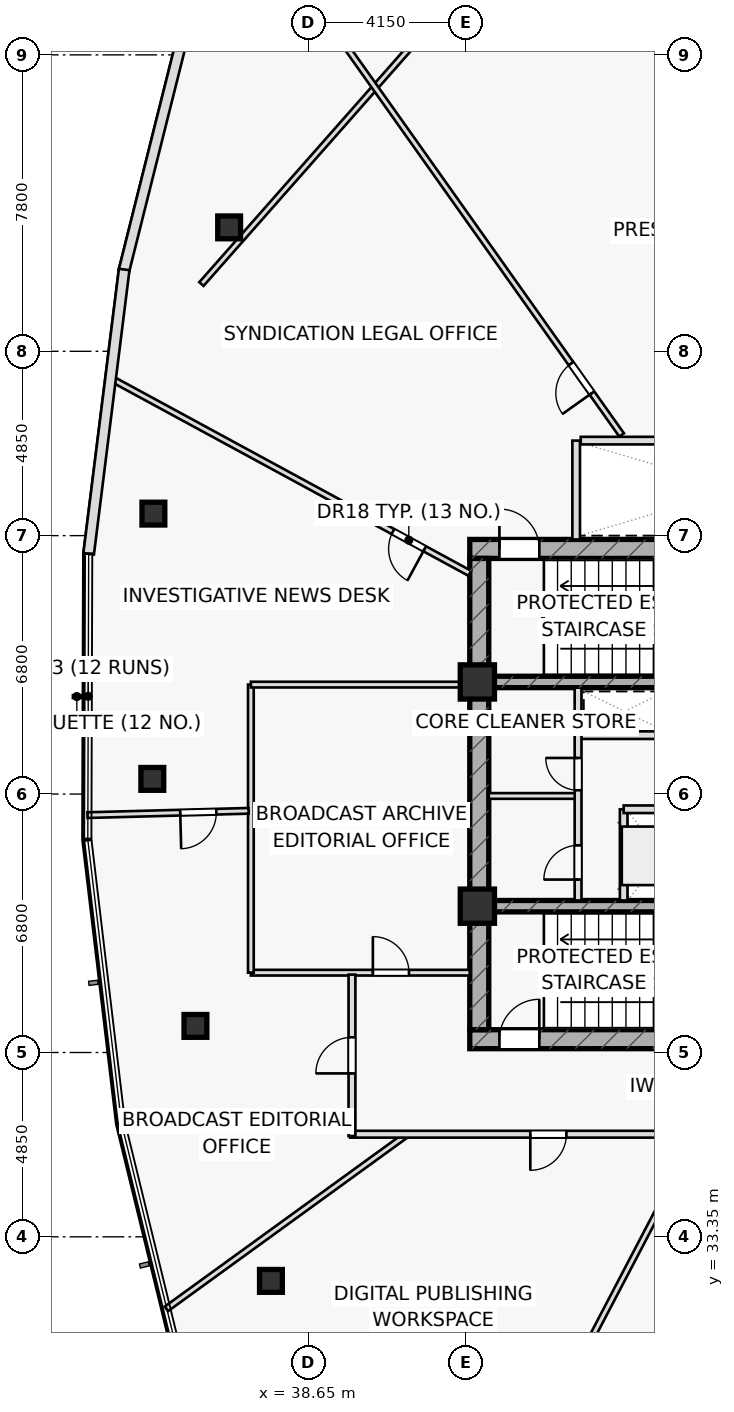
"""IFC4 building model, lengths in metres.
Left out: names, types, materials, properties, quantities, classifications, styles, units other than length and angle.
Written with IfcOpenShell. Run it as: python <this file> out.ifc"""

import sys

from ifc_helpers import new_model, si_unit, direction, frame, frame_2d, origin, origin_2d, place, context, subcontext, project, spatial, rectangle, hollow_rectangle, extrude, element, fill, save


model = new_model("IFC4")
c1 = context("Model", 3, precision=1e-05, world=origin(), true_north=direction((0.0, 1.0)))
c2 = subcontext(c1, "Body", "Model", "MODEL_VIEW")
j1 = project(units=[si_unit("LENGTHUNIT", "METRE"), si_unit("PLANEANGLEUNIT", "RADIAN")], contexts=[c1])
p1 = place(None, origin())
s1 = spatial("IfcSite", under=j1, at=p1, CompositionType="ELEMENT")
p2 = place(p1, origin())
s2 = spatial("IfcBuilding", under=s1, at=p2, CompositionType="ELEMENT")
p3 = place(p2, frame((0.0, 0.0, 173.35)))
s3 = spatial("IfcBuildingStorey", under=s2, at=p3, CompositionType="ELEMENT", Elevation=173.35)
p4 = place(p3, frame((42.9, 51.45, 0.0), z_axis=(0.0, 0.0, 1.0), x_axis=(1.0, 0.0, 0.0)))
e1 = element("IfcWall", 1, at=p4, inside=s3, PredefinedType="SHEAR", context=c2, shape_type="SweptSolid", body=[
    extrude(rectangle(XDim=14.2, YDim=0.5, at=frame_2d((7.1, 0.0))), origin(), (0.0, 0.0, 1.0), 3.55),
])
p5 = place(p4, frame((0.78, 0.0, 0.0)))
e2 = element("IfcOpeningElement", 2, at=p5, cuts=e1, PredefinedType="OPENING", context=c2, shape_type="SweptSolid", body=[
    extrude(rectangle(XDim=1.05, YDim=2.2, at=frame_2d((0.525, 1.1))), frame((0.0, 0.26, 0.0), z_axis=(0.0, -1.0, 0.0), x_axis=(1.0, 0.0, 0.0)), (0.0, 0.0, 1.0), 0.52),
])
p6 = place(p3, frame((42.9, 38.55, 0.0), z_axis=(0.0, 0.0, 1.0), x_axis=(1.0, 0.0, 0.0)))
e3 = element("IfcWall", 3, at=p6, inside=s3, PredefinedType="SHEAR", context=c2, shape_type="SweptSolid", body=[
    extrude(rectangle(XDim=14.2, YDim=0.5, at=frame_2d((7.1, 0.0))), origin(), (0.0, 0.0, 1.0), 3.55),
])
p7 = place(p6, frame((0.78, 0.0, 0.0)))
e4 = element("IfcOpeningElement", 4, at=p7, cuts=e3, PredefinedType="OPENING", context=c2, shape_type="SweptSolid", body=[
    extrude(rectangle(XDim=1.05, YDim=2.2, at=frame_2d((0.525, 1.1))), frame((0.0, 0.26, 0.0), z_axis=(0.0, -1.0, 0.0), x_axis=(1.0, 0.0, 0.0)), (0.0, 0.0, 1.0), 0.52),
])
p8 = place(p3, frame((43.15, 38.8, 0.0), z_axis=(0.0, 0.0, 1.0), x_axis=(0.0, 1.0, 0.0)))
e5 = element("IfcWall", 5, at=p8, inside=s3, PredefinedType="SHEAR", context=c2, shape_type="SweptSolid", body=[
    extrude(rectangle(XDim=12.4, YDim=0.5, at=frame_2d((6.2, 0.0))), origin(), (0.0, 0.0, 1.0), 3.55),
])
p9 = place(p3, frame((43.4, 47.95, 0.0), z_axis=(0.0, 0.0, 1.0), x_axis=(1.0, 0.0, 0.0)))
e6 = element("IfcWall", 6, at=p9, inside=s3, PredefinedType="SHEAR", context=c2, shape_type="SweptSolid", body=[
    extrude(rectangle(XDim=13.2, YDim=0.3, at=frame_2d((6.6, 0.0))), origin(), (0.0, 0.0, 1.0), 3.55),
])
p10 = place(p9, frame((8.345, 0.0, 0.0)))
e7 = element("IfcOpeningElement", 7, at=p10, cuts=e6, PredefinedType="OPENING", context=c2, shape_type="SweptSolid", body=[
    extrude(rectangle(XDim=1.15, YDim=2.2, at=frame_2d((0.575, 1.1))), frame((0.0, 0.16, 0.0), z_axis=(0.0, -1.0, 0.0), x_axis=(1.0, 0.0, 0.0)), (0.0, 0.0, 1.0), 0.32),
])
p11 = place(p9, frame((10.065, 0.0, 0.0)))
e8 = element("IfcOpeningElement", 8, at=p11, cuts=e6, PredefinedType="OPENING", context=c2, shape_type="SweptSolid", body=[
    extrude(rectangle(XDim=1.15, YDim=2.2, at=frame_2d((0.575, 1.1))), frame((0.0, 0.16, 0.0), z_axis=(0.0, -1.0, 0.0), x_axis=(1.0, 0.0, 0.0)), (0.0, 0.0, 1.0), 0.32),
])
p12 = place(p9, frame((11.645, 0.0, 0.0)))
e9 = element("IfcOpeningElement", 9, at=p12, cuts=e6, PredefinedType="OPENING", context=c2, shape_type="SweptSolid", body=[
    extrude(rectangle(XDim=1.15, YDim=2.2, at=frame_2d((0.575, 1.1))), frame((0.0, 0.16, 0.0), z_axis=(0.0, -1.0, 0.0), x_axis=(1.0, 0.0, 0.0)), (0.0, 0.0, 1.0), 0.32),
])
p13 = place(p3, frame((43.4, 42.05, 0.0), z_axis=(0.0, 0.0, 1.0), x_axis=(1.0, 0.0, 0.0)))
e10 = element("IfcWall", 10, at=p13, inside=s3, PredefinedType="SHEAR", context=c2, shape_type="SweptSolid", body=[
    extrude(rectangle(XDim=13.2, YDim=0.3, at=frame_2d((6.6, 0.0))), origin(), (0.0, 0.0, 1.0), 3.55),
])
p14 = place(p13, frame((8.37, 0.0, 0.0)))
e11 = element("IfcOpeningElement", 11, at=p14, cuts=e10, PredefinedType="OPENING", context=c2, shape_type="SweptSolid", body=[
    extrude(rectangle(XDim=1.1, YDim=2.15, at=frame_2d((0.55, 1.075))), frame((0.0, 0.16, 0.0), z_axis=(0.0, -1.0, 0.0), x_axis=(1.0, 0.0, 0.0)), (0.0, 0.0, 1.0), 0.32),
])
p15 = place(p13, frame((10.09, 0.0, 0.0)))
e12 = element("IfcOpeningElement", 12, at=p15, cuts=e10, PredefinedType="OPENING", context=c2, shape_type="SweptSolid", body=[
    extrude(rectangle(XDim=1.1, YDim=2.15, at=frame_2d((0.55, 1.075))), frame((0.0, 0.16, 0.0), z_axis=(0.0, -1.0, 0.0), x_axis=(1.0, 0.0, 0.0)), (0.0, 0.0, 1.0), 0.32),
])
p16 = place(p13, frame((11.83, 0.0, 0.0)))
e13 = element("IfcOpeningElement", 13, at=p16, cuts=e10, PredefinedType="OPENING", context=c2, shape_type="SweptSolid", body=[
    extrude(rectangle(XDim=1.1, YDim=2.15, at=frame_2d((0.55, 1.075))), frame((0.0, 0.16, 0.0), z_axis=(0.0, -1.0, 0.0), x_axis=(1.0, 0.0, 0.0)), (0.0, 0.0, 1.0), 0.32),
])
for number, where, z_axis, x_axis in (
    (14, (43.1, 47.95, 0.0), (0.0, 0.0, 1.0), (1.0, 0.0, 0.0)),
    (15, (43.1, 42.05, 0.0), (0.0, 0.0, 1.0), (1.0, 0.0, 0.0)),
):
    element("IfcColumn", number, at=place(p3, frame(where, z_axis=z_axis, x_axis=x_axis)), inside=s3, PredefinedType="COLUMN", context=c2, shape_type="SweptSolid", body=[
        extrude(rectangle(XDim=0.9, YDim=0.9, at=origin_2d()), origin(), (0.0, 0.0, 1.0), 3.55),
    ])
for number, where, z_axis, x_axis in (
    (16, (36.568, 59.911, 0.0), (0.0, 0.0, 1.0), (1.0, 0.0, 0.0)),
    (17, (34.575, 52.379, 0.0), (0.0, 0.0, 1.0), (1.0, 0.0, 0.0)),
    (18, (34.546, 45.399, 0.0), (0.0, 0.0, 1.0), (1.0, 0.0, 0.0)),
    (19, (35.681, 38.9, 0.0), (0.0, 0.0, 1.0), (1.0, 0.0, 0.0)),
    (20, (37.668, 32.19, 0.0), (0.0, 0.0, 1.0), (1.0, 0.0, 0.0)),
):
    element("IfcColumn", number, at=place(p3, frame(where, z_axis=z_axis, x_axis=x_axis)), inside=s3, PredefinedType="COLUMN", context=c2, shape_type="SweptSolid", body=[
        extrude(hollow_rectangle(XDim=0.6, YDim=0.6, WallThickness=0.036, at=origin_2d()), origin(), (0.0, 0.0, 1.0), 3.55),
    ])
p17 = place(p3, frame((45.7, 51.7, 0.0), z_axis=(0.0, 0.0, 1.0), x_axis=(0.0, 1.0, 0.0)))
e21 = element("IfcWall", 21, at=p17, inside=s3, PredefinedType="PARTITIONING", context=c2, shape_type="SweptSolid", body=[
    extrude(rectangle(XDim=2.6, YDim=0.2, at=frame_2d((1.3, 0.0))), origin(), (0.0, 0.0, 1.0), 3.55),
])
p18 = place(p3, frame((45.75, 46.55, 0.0), z_axis=(0.0, 0.0, 1.0), x_axis=(1.0, 0.0, 0.0)))
e22 = element("IfcWall", 22, at=p18, inside=s3, PredefinedType="PARTITIONING", context=c2, shape_type="SweptSolid", body=[
    extrude(rectangle(XDim=2.4, YDim=0.2, at=frame_2d((1.2, 0.0))), origin(), (0.0, 0.0, 1.0), 3.55),
])
p19 = place(p3, frame((46.95, 42.2, 0.0), z_axis=(0.0, 0.0, 1.0), x_axis=(0.0, 1.0, 0.0)))
e23 = element("IfcWall", 23, at=p19, inside=s3, PredefinedType="PARTITIONING", context=c2, shape_type="SweptSolid", body=[
    extrude(rectangle(XDim=2.4, YDim=0.2, at=frame_2d((1.2, 0.0))), origin(), (0.0, 0.0, 1.0), 3.55),
])
p20 = place(p3, frame((46.95, 44.6, 0.0), z_axis=(0.0, 0.0, 1.0), x_axis=(1.0, 0.0, 0.0)))
e24 = element("IfcWall", 24, at=p20, inside=s3, PredefinedType="PARTITIONING", context=c2, shape_type="SweptSolid", body=[
    extrude(rectangle(XDim=2.05, YDim=0.2, at=frame_2d((1.025, 0.0))), origin(), (0.0, 0.0, 1.0), 3.55),
])
p21 = place(p3, frame((43.4, 44.95, 0.0), z_axis=(0.0, 0.0, 1.0), x_axis=(1.0, 0.0, 0.0)))
e25 = element("IfcWall", 25, at=p21, inside=s3, PredefinedType="PARTITIONING", context=c2, shape_type="SweptSolid", body=[
    extrude(rectangle(XDim=2.35, YDim=0.15, at=frame_2d((1.175, 0.0))), origin(), (0.0, 0.0, 1.0), 3.55),
])
p22 = place(p3, frame((45.75, 42.2, 0.0), z_axis=(0.0, 0.0, 1.0), x_axis=(0.0, 1.0, 0.0)))
e26 = element("IfcWall", 26, at=p22, inside=s3, PredefinedType="PARTITIONING", context=c2, shape_type="SweptSolid", body=[
    extrude(rectangle(XDim=5.6, YDim=0.18, at=frame_2d((2.8, 0.0))), origin(), (0.0, 0.0, 1.0), 3.55),
])
p23 = place(p22, frame((0.55, 0.0, 0.0)))
e27 = element("IfcOpeningElement", 27, at=p23, cuts=e26, PredefinedType="OPENING", context=c2, shape_type="SweptSolid", body=[
    extrude(rectangle(XDim=0.9, YDim=2.05, at=frame_2d((0.45, 1.025))), frame((0.0, 0.1, 0.0), z_axis=(0.0, -1.0, 0.0), x_axis=(1.0, 0.0, 0.0)), (0.0, 0.0, 1.0), 0.2),
])
p24 = place(p22, frame((2.9, 0.0, 0.0)))
e28 = element("IfcOpeningElement", 28, at=p24, cuts=e26, PredefinedType="OPENING", context=c2, shape_type="SweptSolid", body=[
    extrude(rectangle(XDim=0.85, YDim=2.05, at=frame_2d((0.425, 1.025))), frame((0.0, 0.1, 0.0), z_axis=(0.0, -1.0, 0.0), x_axis=(1.0, 0.0, 0.0)), (0.0, 0.0, 1.0), 0.2),
])
p25 = place(p3, frame((43.4, 66.989, 0.0), z_axis=(0.0, 0.0, 1.0), x_axis=(-0.661622343701, -0.749837231881, 0.0)))
e29 = element("IfcWall", 29, at=p25, inside=s3, PredefinedType="PARTITIONING", context=c2, shape_type="SweptSolid", body=[
    extrude(rectangle(XDim=11.427, YDim=0.15, at=frame_2d((5.714, 0.0))), origin(), (0.0, 0.0, 1.0), 2.935),
])
p26 = place(p3, frame((37.14, 40.3, 0.0), z_axis=(0.0, 0.0, 1.0), x_axis=(1.0, 0.0, 0.0)))
e30 = element("IfcWall", 30, at=p26, inside=s3, PredefinedType="PARTITIONING", context=c2, shape_type="SweptSolid", body=[
    extrude(rectangle(XDim=5.76, YDim=0.15, at=frame_2d((2.88, 0.0))), origin(), (0.0, 0.0, 1.0), 3.55),
])
p27 = place(p26, frame((3.21, 0.0, 0.0)))
e31 = element("IfcOpeningElement", 31, at=p27, cuts=e30, PredefinedType="OPENING", context=c2, shape_type="SweptSolid", body=[
    extrude(rectangle(XDim=0.95, YDim=2.05, at=frame_2d((0.475, 1.025))), frame((0.0, 0.085, 0.0), z_axis=(0.0, -1.0, 0.0), x_axis=(1.0, 0.0, 0.0)), (0.0, 0.0, 1.0), 0.17),
])
p28 = place(p3, frame((37.14, 40.3, 0.0), z_axis=(0.0, 0.0, 1.0), x_axis=(0.0, 1.0, 0.0)))
e32 = element("IfcWall", 32, at=p28, inside=s3, PredefinedType="PARTITIONING", context=c2, shape_type="SweptSolid", body=[
    extrude(rectangle(XDim=7.58, YDim=0.15, at=frame_2d((3.79, 0.0))), origin(), (0.0, 0.0, 1.0), 2.935),
])
p29 = place(p3, frame((37.14, 47.88, 0.0), z_axis=(0.0, 0.0, 1.0), x_axis=(1.0, 0.0, 0.0)))
e33 = element("IfcWall", 33, at=p29, inside=s3, PredefinedType="PARTITIONING", context=c2, shape_type="SweptSolid", body=[
    extrude(rectangle(XDim=5.76, YDim=0.15, at=frame_2d((2.88, 0.0))), origin(), (0.0, 0.0, 1.0), 2.935),
])
p30 = place(p3, frame((42.9, 50.81, 0.0), z_axis=(0.0, 0.0, 1.0), x_axis=(-0.878812674831, 0.477166933637, 0.0)))
e34 = element("IfcWall", 34, at=p30, inside=s3, PredefinedType="PARTITIONING", context=c2, shape_type="SweptSolid", body=[
    extrude(rectangle(XDim=10.765, YDim=0.15, at=frame_2d((5.383, 0.0))), origin(), (0.0, 0.0, 1.0), 2.935),
])
p31 = place(p30, frame((1.35, 0.0, 0.0)))
e35 = element("IfcOpeningElement", 35, at=p31, cuts=e34, PredefinedType="OPENING", context=c2, shape_type="SweptSolid", body=[
    extrude(rectangle(XDim=0.95, YDim=2.05, at=frame_2d((0.475, 1.025))), frame((0.0, 0.085, 0.0), z_axis=(0.0, -1.0, 0.0), x_axis=(1.0, 0.0, 0.0)), (0.0, 0.0, 1.0), 0.17),
])
p32 = place(p3, frame((37.08, 44.559, 0.0), z_axis=(0.0, 0.0, 1.0), x_axis=(-0.999644695323, -0.026654889077, 0.0)))
e36 = element("IfcWall", 36, at=p32, inside=s3, PredefinedType="PARTITIONING", context=c2, shape_type="SweptSolid", body=[
    extrude(rectangle(XDim=4.241, YDim=0.15, at=frame_2d((2.12, 0.0))), origin(), (0.0, 0.0, 1.0), 3.025),
])
p33 = place(p32, frame((0.85, 0.0, 0.0)))
e37 = element("IfcOpeningElement", 37, at=p33, cuts=e36, PredefinedType="OPENING", context=c2, shape_type="SweptSolid", body=[
    extrude(rectangle(XDim=0.95, YDim=2.05, at=frame_2d((0.475, 1.025))), frame((0.0, 0.085, 0.0), z_axis=(0.0, -1.0, 0.0), x_axis=(1.0, 0.0, 0.0)), (0.0, 0.0, 1.0), 0.17),
])
p34 = place(p3, frame((41.256, 36.05, 0.0), z_axis=(0.0, 0.0, 1.0), x_axis=(-0.80959562295, -0.586988012911, 0.0)))
e38 = element("IfcWall", 38, at=p34, inside=s3, PredefinedType="PARTITIONING", context=c2, shape_type="SweptSolid", body=[
    extrude(rectangle(XDim=7.828, YDim=0.15, at=frame_2d((3.914, 0.0))), origin(), (0.0, 0.0, 1.0), 2.935),
])
p35 = place(p3, frame((48.911, 36.05, 0.0), z_axis=(0.0, 0.0, 1.0), x_axis=(-0.46406264492, -0.885802382922, 0.0)))
e39 = element("IfcWall", 39, at=p35, inside=s3, PredefinedType="PARTITIONING", context=c2, shape_type="SweptSolid", body=[
    extrude(rectangle(XDim=18.852, YDim=0.15, at=frame_2d((9.426, 0.0))), origin(), (0.0, 0.0, 1.0), 2.935),
])
p36 = place(p3, frame((46.896, 54.45, 0.0), z_axis=(0.0, 0.0, 1.0), x_axis=(-0.578632017692, 0.815588737111, 0.0)))
e40 = element("IfcWall", 40, at=p36, inside=s3, PredefinedType="PARTITIONING", context=c2, shape_type="SweptSolid", body=[
    extrude(rectangle(XDim=17.264, YDim=0.15, at=frame_2d((8.632, 0.0))), origin(), (0.0, 0.0, 1.0), 2.935),
])
p37 = place(p36, frame((1.35, 0.0, 0.0)))
e41 = element("IfcOpeningElement", 41, at=p37, cuts=e40, PredefinedType="OPENING", context=c2, shape_type="SweptSolid", body=[
    extrude(rectangle(XDim=0.95, YDim=2.05, at=frame_2d((0.475, 1.025))), frame((0.0, 0.085, 0.0), z_axis=(0.0, -1.0, 0.0), x_axis=(1.0, 0.0, 0.0)), (0.0, 0.0, 1.0), 0.17),
])
p38 = place(p3, frame((59.4, 36.05, 0.0), z_axis=(0.0, 0.0, 1.0), x_axis=(-1.0, 0.0, 0.0)))
e42 = element("IfcWall", 42, at=p38, inside=s3, PredefinedType="PARTITIONING", context=c2, shape_type="SweptSolid", body=[
    extrude(rectangle(XDim=19.65, YDim=0.18, at=frame_2d((9.825, 0.0))), origin(), (0.0, 0.0, 1.0), 2.935),
])
p39 = place(p38, frame((3.374, 0.0, 0.0)))
e43 = element("IfcOpeningElement", 43, at=p39, cuts=e42, PredefinedType="OPENING", context=c2, shape_type="SweptSolid", body=[
    extrude(rectangle(XDim=0.95, YDim=2.05, at=frame_2d((0.475, 1.025))), frame((0.0, 0.1, 0.0), z_axis=(0.0, -1.0, 0.0), x_axis=(1.0, 0.0, 0.0)), (0.0, 0.0, 1.0), 0.2),
])
p40 = place(p38, frame((7.369, 0.0, 0.0)))
e44 = element("IfcOpeningElement", 44, at=p40, cuts=e42, PredefinedType="OPENING", context=c2, shape_type="SweptSolid", body=[
    extrude(rectangle(XDim=0.95, YDim=2.05, at=frame_2d((0.475, 1.025))), frame((0.0, 0.1, 0.0), z_axis=(0.0, -1.0, 0.0), x_axis=(1.0, 0.0, 0.0)), (0.0, 0.0, 1.0), 0.2),
])
p41 = place(p38, frame((13.957, 0.0, 0.0)))
e45 = element("IfcOpeningElement", 45, at=p41, cuts=e42, PredefinedType="OPENING", context=c2, shape_type="SweptSolid", body=[
    extrude(rectangle(XDim=0.95, YDim=2.05, at=frame_2d((0.475, 1.025))), frame((0.0, 0.1, 0.0), z_axis=(0.0, -1.0, 0.0), x_axis=(1.0, 0.0, 0.0)), (0.0, 0.0, 1.0), 0.2),
])
p42 = place(p3, frame((39.8, 36.0, 0.0), z_axis=(0.0, 0.0, 1.0), x_axis=(0.0, 1.0, 0.0)))
e46 = element("IfcWall", 46, at=p42, inside=s3, PredefinedType="PARTITIONING", context=c2, shape_type="SweptSolid", body=[
    extrude(rectangle(XDim=4.25, YDim=0.18, at=frame_2d((2.125, 0.0))), origin(), (0.0, 0.0, 1.0), 2.935),
])
p43 = place(p42, frame((1.65, 0.0, 0.0)))
e47 = element("IfcOpeningElement", 47, at=p43, cuts=e46, PredefinedType="OPENING", context=c2, shape_type="SweptSolid", body=[
    extrude(rectangle(XDim=0.95, YDim=2.05, at=frame_2d((0.475, 1.025))), frame((0.0, 0.1, 0.0), z_axis=(0.0, -1.0, 0.0), x_axis=(1.0, 0.0, 0.0)), (0.0, 0.0, 1.0), 0.2),
])
p44 = place(p3, frame((35.638, 66.099, 0.0), z_axis=(0.0, 0.0, 1.0), x_axis=(-0.243220113246, -0.969971121484, 0.0)))
e48 = element("IfcWall", 48, at=p44, inside=s3, PredefinedType="STANDARD", context=c2, shape_type="SweptSolid", body=[
    extrude(rectangle(XDim=7.552, YDim=0.28, at=frame_2d((3.776, 0.0))), origin(), (0.0, 0.0, 1.0), 3.55),
])
p45 = place(p3, frame((33.807, 58.803, 0.0), z_axis=(0.0, 0.0, 1.0), x_axis=(-0.124038719528, -0.992277378588, 0.0)))
e49 = element("IfcWall", 49, at=p45, inside=s3, PredefinedType="STANDARD", context=c2, shape_type="SweptSolid", body=[
    extrude(rectangle(XDim=7.541, YDim=0.28, at=frame_2d((3.77, 0.0))), origin(), (0.0, 0.0, 1.0), 3.55),
])
p46 = place(p3, frame((45.82, 54.3, 0.0), z_axis=(0.0, 0.0, 1.0), x_axis=(1.0, 0.0, 0.0)))
e50 = element("IfcWall", 50, at=p46, inside=s3, PredefinedType="PARTITIONING", context=c2, shape_type="SweptSolid", body=[
    extrude(rectangle(XDim=8.31, YDim=0.2, at=frame_2d((4.155, 0.0))), origin(), (0.0, 0.0, 1.0), 3.55),
])
p47 = place(p5, origin())
e51 = element("IfcDoor", 51, at=p47, inside=s3, OperationType="SINGLE_SWING_LEFT", PredefinedType="DOOR", context=c2, shape_type="SweptSolid", body=[
    extrude(rectangle(XDim=1.05, YDim=2.2, at=frame_2d((0.525, 1.1))), frame((0.0, 0.025, 0.0), z_axis=(0.0, -1.0, 0.0), x_axis=(1.0, 0.0, 0.0)), (0.0, 0.0, 1.0), 0.05),
])
fill(e2, e51)
p48 = place(p7, origin())
e52 = element("IfcDoor", 52, at=p48, inside=s3, OperationType="SINGLE_SWING_RIGHT", PredefinedType="DOOR", context=c2, shape_type="SweptSolid", body=[
    extrude(rectangle(XDim=1.05, YDim=2.2, at=frame_2d((0.525, 1.1))), frame((0.0, 0.025, 0.0), z_axis=(0.0, -1.0, 0.0), x_axis=(1.0, 0.0, 0.0)), (0.0, 0.0, 1.0), 0.05),
])
fill(e4, e52)
p49 = place(p23, origin())
e53 = element("IfcDoor", 53, at=p49, inside=s3, OperationType="SINGLE_SWING_LEFT", PredefinedType="DOOR", context=c2, shape_type="SweptSolid", body=[
    extrude(rectangle(XDim=0.9, YDim=2.05, at=frame_2d((0.45, 1.025))), frame((0.0, 0.025, 0.0), z_axis=(0.0, -1.0, 0.0), x_axis=(1.0, 0.0, 0.0)), (0.0, 0.0, 1.0), 0.05),
])
fill(e27, e53)
p50 = place(p24, origin())
e54 = element("IfcDoor", 54, at=p50, inside=s3, OperationType="SINGLE_SWING_RIGHT", PredefinedType="DOOR", context=c2, shape_type="SweptSolid", body=[
    extrude(rectangle(XDim=0.85, YDim=2.05, at=frame_2d((0.425, 1.025))), frame((0.0, 0.025, 0.0), z_axis=(0.0, -1.0, 0.0), x_axis=(1.0, 0.0, 0.0)), (0.0, 0.0, 1.0), 0.05),
])
fill(e28, e54)
p51 = place(p27, origin())
e55 = element("IfcDoor", 55, at=p51, inside=s3, OperationType="SINGLE_SWING_LEFT", PredefinedType="DOOR", context=c2, shape_type="SweptSolid", body=[
    extrude(rectangle(XDim=0.95, YDim=2.05, at=frame_2d((0.475, 1.025))), frame((0.0, 0.025, 0.0), z_axis=(0.0, -1.0, 0.0), x_axis=(1.0, 0.0, 0.0)), (0.0, 0.0, 1.0), 0.05),
])
fill(e31, e55)
p52 = place(p31, origin())
e56 = element("IfcDoor", 56, at=p52, inside=s3, OperationType="SINGLE_SWING_LEFT", PredefinedType="DOOR", context=c2, shape_type="SweptSolid", body=[
    extrude(rectangle(XDim=0.95, YDim=2.05, at=frame_2d((0.475, 1.025))), frame((0.0, 0.025, 0.0), z_axis=(0.0, -1.0, 0.0), x_axis=(1.0, 0.0, 0.0)), (0.0, 0.0, 1.0), 0.05),
])
fill(e35, e56)
p53 = place(p33, origin())
e57 = element("IfcDoor", 57, at=p53, inside=s3, OperationType="SINGLE_SWING_RIGHT", PredefinedType="DOOR", context=c2, shape_type="SweptSolid", body=[
    extrude(rectangle(XDim=0.95, YDim=2.05, at=frame_2d((0.475, 1.025))), frame((0.0, 0.025, 0.0), z_axis=(0.0, -1.0, 0.0), x_axis=(1.0, 0.0, 0.0)), (0.0, 0.0, 1.0), 0.05),
])
fill(e37, e57)
p54 = place(p37, origin())
e58 = element("IfcDoor", 58, at=p54, inside=s3, OperationType="SINGLE_SWING_LEFT", PredefinedType="DOOR", context=c2, shape_type="SweptSolid", body=[
    extrude(rectangle(XDim=0.95, YDim=2.05, at=frame_2d((0.475, 1.025))), frame((0.0, 0.025, 0.0), z_axis=(0.0, -1.0, 0.0), x_axis=(1.0, 0.0, 0.0)), (0.0, 0.0, 1.0), 0.05),
])
fill(e41, e58)
p55 = place(p41, origin())
e59 = element("IfcDoor", 59, at=p55, inside=s3, OperationType="SINGLE_SWING_RIGHT", PredefinedType="DOOR", context=c2, shape_type="SweptSolid", body=[
    extrude(rectangle(XDim=0.95, YDim=2.05, at=frame_2d((0.475, 1.025))), frame((0.0, 0.025, 0.0), z_axis=(0.0, -1.0, 0.0), x_axis=(1.0, 0.0, 0.0)), (0.0, 0.0, 1.0), 0.05),
])
fill(e45, e59)
p56 = place(p43, origin())
e60 = element("IfcDoor", 60, at=p56, inside=s3, OperationType="SINGLE_SWING_LEFT", PredefinedType="DOOR", context=c2, shape_type="SweptSolid", body=[
    extrude(rectangle(XDim=0.95, YDim=2.05, at=frame_2d((0.475, 1.025))), frame((0.0, 0.025, 0.0), z_axis=(0.0, -1.0, 0.0), x_axis=(1.0, 0.0, 0.0)), (0.0, 0.0, 1.0), 0.05),
])
fill(e47, e60)
save(model, sys.argv[1])
